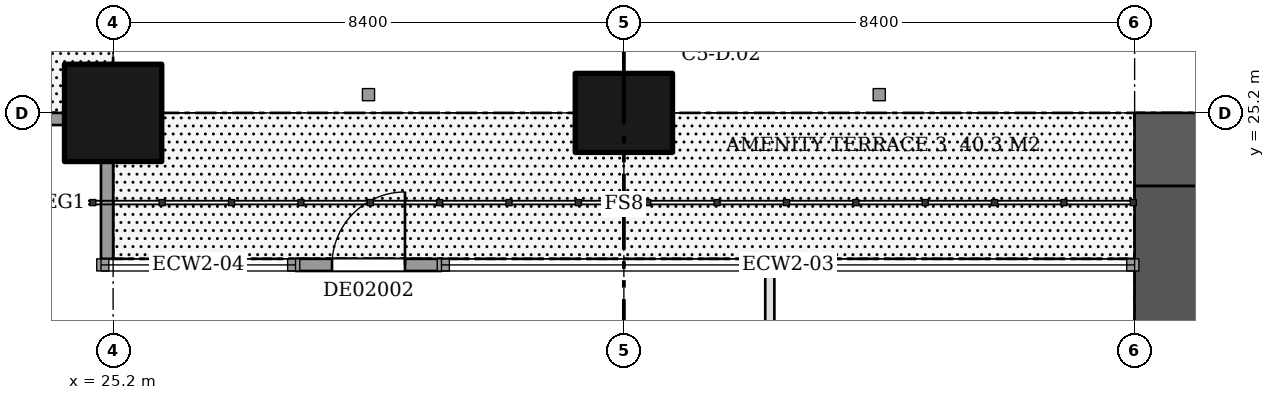
"""IFC4 building model, lengths in metres.
Left out: names, types, materials, properties, quantities, classifications, styles, units other than length and angle.
Written with IfcOpenShell. Run it as: python <this file> out.ifc"""

import sys

from ifc_helpers import new_model, si_unit, direction, frame, frame_2d, origin, origin_2d, place, context, subcontext, project, spatial, rectangle, extrude, element, fill, save


model = new_model("IFC4")
c1 = context("Model", 3, precision=1e-05, world=origin(), true_north=direction((0.0, 1.0)))
c2 = subcontext(c1, "Body", "Model", "MODEL_VIEW")
j1 = project(units=[si_unit("LENGTHUNIT", "METRE"), si_unit("PLANEANGLEUNIT", "RADIAN")], contexts=[c1])
p1 = place(None, origin())
s1 = spatial("IfcSite", under=j1, at=p1, CompositionType="ELEMENT")
p2 = place(p1, origin())
s2 = spatial("IfcBuilding", under=s1, at=p2, CompositionType="ELEMENT")
p3 = place(p2, frame((0.0, 0.0, 14.4)))
s3 = spatial("IfcBuildingStorey", under=s2, at=p3, CompositionType="ELEMENT", Elevation=14.4)
p4 = place(p3, frame((25.2, 25.2, 0.0), z_axis=(0.0, 0.0, 1.0), x_axis=(1.0, 0.0, 0.0)))
e1 = element("IfcColumn", 1, at=p4, inside=s3, PredefinedType="COLUMN", context=c2, shape_type="SweptSolid", body=[
    extrude(rectangle(XDim=1.6, YDim=1.6, at=origin_2d()), origin(), (0.0, 0.0, 1.0), 5.1),
])
p5 = place(p3, frame((33.6, 25.2, 0.0), z_axis=(0.0, 0.0, 1.0), x_axis=(1.0, 0.0, 0.0)))
e2 = element("IfcColumn", 2, at=p5, inside=s3, PredefinedType="COLUMN", context=c2, shape_type="SweptSolid", body=[
    extrude(rectangle(XDim=1.6, YDim=1.3, at=origin_2d()), origin(), (0.0, 0.0, 1.0), 5.1),
])
p6 = place(p3, frame((42.0, 24.6, 0.0), z_axis=(0.0, 0.0, 1.0), x_axis=(1.0, 0.0, 0.0)))
e3 = element("IfcWall", 3, at=p6, inside=s3, PredefinedType="SHEAR", context=c2, shape_type="SweptSolid", body=[
    extrude(rectangle(XDim=16.8, YDim=1.2, at=frame_2d((8.4, 0.0))), origin(), (0.0, 0.0, 1.0), 5.1),
])
p7 = place(p6, frame((1.8, 0.0, 0.5)))
e4 = element("IfcOpeningElement", 4, at=p7, cuts=e3, PredefinedType="OPENING", context=c2, shape_type="SweptSolid", body=[
    extrude(rectangle(XDim=1.8, YDim=2.4, at=frame_2d((0.9, 1.2))), frame((0.0, 0.61, 0.0), z_axis=(0.0, -1.0, 0.0), x_axis=(1.0, 0.0, 0.0)), (0.0, 0.0, 1.0), 1.22),
])
p8 = place(p6, frame((4.644, 0.0, 1.6)))
e5 = element("IfcOpeningElement", 5, at=p8, cuts=e3, PredefinedType="OPENING", context=c2, shape_type="SweptSolid", body=[
    extrude(rectangle(XDim=1.2, YDim=1.2, at=frame_2d((0.6, 0.6))), frame((0.0, 0.61, 0.0), z_axis=(0.0, -1.0, 0.0), x_axis=(1.0, 0.0, 0.0)), (0.0, 0.0, 1.0), 1.22),
])
p9 = place(p6, frame((6.45, 0.0, 1.6)))
e6 = element("IfcOpeningElement", 6, at=p9, cuts=e3, PredefinedType="OPENING", context=c2, shape_type="SweptSolid", body=[
    extrude(rectangle(XDim=1.8, YDim=1.2, at=frame_2d((0.9, 0.6))), frame((0.0, 0.61, 0.0), z_axis=(0.0, -1.0, 0.0), x_axis=(1.0, 0.0, 0.0)), (0.0, 0.0, 1.0), 1.22),
])
p10 = place(p6, frame((12.65, 0.0, 0.5)))
e7 = element("IfcOpeningElement", 7, at=p10, cuts=e3, PredefinedType="OPENING", context=c2, shape_type="SweptSolid", body=[
    extrude(rectangle(XDim=1.8, YDim=2.4, at=frame_2d((0.9, 1.2))), frame((0.0, 0.61, 0.0), z_axis=(0.0, -1.0, 0.0), x_axis=(1.0, 0.0, 0.0)), (0.0, 0.0, 1.0), 1.22),
])
p11 = place(p3, frame((42.6, 9.6, 0.0), z_axis=(0.0, 0.0, 1.0), x_axis=(0.0, 1.0, 0.0)))
e8 = element("IfcWall", 8, at=p11, inside=s3, PredefinedType="SHEAR", context=c2, shape_type="SweptSolid", body=[
    extrude(rectangle(XDim=14.4, YDim=1.2, at=frame_2d((7.2, 0.0))), origin(), (0.0, 0.0, 1.0), 5.1),
])
p12 = place(p11, frame((2.1, 0.0, 0.0)))
e9 = element("IfcOpeningElement", 9, at=p12, cuts=e8, PredefinedType="OPENING", context=c2, shape_type="SweptSolid", body=[
    extrude(rectangle(XDim=1.8, YDim=2.1, at=frame_2d((0.9, 1.05))), frame((0.0, 0.61, 0.0), z_axis=(0.0, -1.0, 0.0), x_axis=(1.0, 0.0, 0.0)), (0.0, 0.0, 1.0), 1.22),
])
p13 = place(p3, frame((36.0, 16.875, 0.0), z_axis=(0.0, 0.0, 1.0), x_axis=(0.0, 1.0, 0.0)))
e10 = element("IfcWall", 10, at=p13, inside=s3, PredefinedType="PARTITIONING", context=c2, shape_type="SweptSolid", body=[
    extrude(rectangle(XDim=5.825, YDim=0.15, at=frame_2d((2.913, 0.0))), origin(), (0.0, 0.0, 1.0), 5.1),
])
p14 = place(p3, frame((30.6, 22.7, 0.0), z_axis=(0.0, 0.0, 1.0), x_axis=(-1.0, 0.0, 0.0)))
e11 = element("IfcWall", 11, at=p14, inside=s3, PredefinedType="SOLIDWALL", context=c2, shape_type="SweptSolid", body=[
    extrude(rectangle(XDim=2.4, YDim=0.2, at=frame_2d((1.2, 0.0))), origin(), (0.0, 0.0, 1.0), 5.1),
])
p15 = place(p14, frame((0.6, 0.0, 0.0)))
e12 = element("IfcOpeningElement", 12, at=p15, cuts=e11, PredefinedType="OPENING", context=c2, shape_type="SweptSolid", body=[
    extrude(rectangle(XDim=1.2, YDim=2.4, at=frame_2d((0.6, 1.2))), frame((0.0, 0.11, 0.0), z_axis=(0.0, -1.0, 0.0), x_axis=(1.0, 0.0, 0.0)), (0.0, 0.0, 1.0), 0.22),
])
p16 = place(p3, frame((25.1, 22.8, 0.0), z_axis=(0.0, 0.0, 1.0), x_axis=(0.0, 1.0, 0.0)))
e13 = element("IfcWall", 13, at=p16, inside=s3, PredefinedType="SOLIDWALL", context=c2, shape_type="SweptSolid", body=[
    extrude(rectangle(XDim=1.6, YDim=0.2, at=frame_2d((0.8, 0.0))), origin(), (0.0, 0.0, 1.0), 5.1),
])
p17 = place(p3, frame((24.4, 25.1, 0.0), z_axis=(0.0, 0.0, 1.0), x_axis=(-1.0, 0.0, 0.0)))
e14 = element("IfcWall", 14, at=p17, inside=s3, PredefinedType="SOLIDWALL", context=c2, shape_type="SweptSolid", body=[
    extrude(rectangle(XDim=1.8, YDim=0.2, at=frame_2d((0.9, 0.0))), origin(), (0.0, 0.0, 1.0), 5.1),
])
p18 = place(p15, frame((1.2, 0.0, 0.0), z_axis=(0.0, 0.0, 1.0), x_axis=(-1.0, 0.0, 0.0)))
e15 = element("IfcDoor", 15, at=p18, inside=s3, OperationType="SINGLE_SWING_RIGHT", PredefinedType="DOOR", context=c2, shape_type="SweptSolid", body=[
    extrude(rectangle(XDim=1.2, YDim=2.4, at=frame_2d((0.6, 1.2))), frame((0.0, 0.025, 0.0), z_axis=(0.0, -1.0, 0.0), x_axis=(1.0, 0.0, 0.0)), (0.0, 0.0, 1.0), 0.05),
])
fill(e12, e15)
save(model, sys.argv[1])
